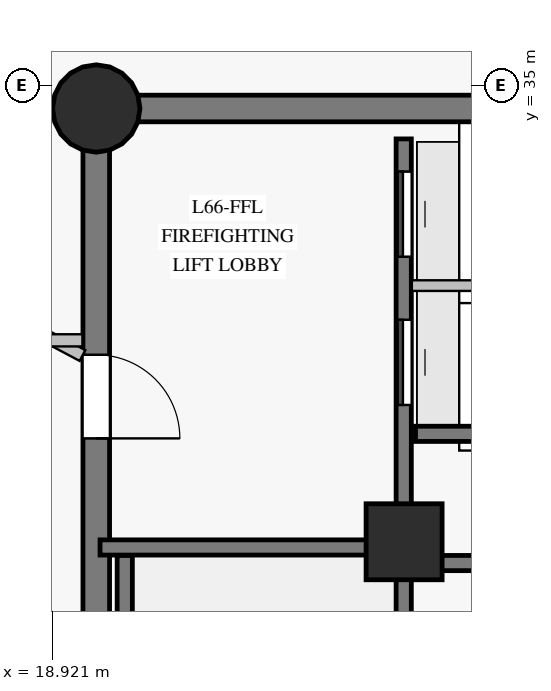
"""IFC4 building model, lengths in metres.
Left out: names, types, materials, properties, quantities, classifications, styles, units other than length and angle.
Written with IfcOpenShell. Run it as: python <this file> out.ifc"""

import sys

from ifc_helpers import new_model, si_unit, direction, frame, frame_2d, origin, origin_with_axes, origin_2d, place, context, subcontext, project, spatial, rectangle, circle, extrude, source, transform, mapped, element, fill, save


model = new_model("IFC4")
c1 = context("Model", 3, precision=1e-05, world=origin(), true_north=direction((0.0, 1.0)))
c2 = subcontext(c1, "Body", "Model", "MODEL_VIEW")
j1 = project(units=[si_unit("LENGTHUNIT", "METRE"), si_unit("PLANEANGLEUNIT", "RADIAN")], contexts=[c1])
p1 = place(None, origin())
s1 = spatial("IfcSite", under=j1, at=p1, CompositionType="ELEMENT")
p2 = place(p1, origin())
s2 = spatial("IfcBuilding", under=s1, at=p2, CompositionType="ELEMENT")
p3 = place(p2, frame((0.0, 0.0, 226.05)))
s3 = spatial("IfcBuildingStorey", under=s2, at=p3, CompositionType="ELEMENT", Elevation=226.05)
p4 = place(p3, frame((26.55, 34.7, 0.0), z_axis=(0.0, 0.0, 1.0), x_axis=(-1.0, 0.0, 0.0)))
e1 = element("IfcWall", 1, at=p4, inside=s3, PredefinedType="SHEAR", context=c2, shape_type="SweptSolid", body=[
    extrude(rectangle(XDim=7.05, YDim=0.35, at=frame_2d((3.525, 0.0))), origin(), (0.0, 0.0, 1.0), 2.85),
])
p5 = place(p3, frame((19.5, 34.7, 0.0), z_axis=(0.0, 0.0, 1.0), x_axis=(0.0, -1.0, 0.0)))
e2 = element("IfcWall", 2, at=p5, inside=s3, PredefinedType="SHEAR", context=c2, shape_type="SweptSolid", body=[
    extrude(rectangle(XDim=16.4, YDim=0.35, at=frame_2d((8.2, 0.0))), origin(), (0.0, 0.0, 1.0), 2.85),
])
p6 = place(p5, frame((3.24, 0.0, 0.0)))
e3 = element("IfcOpeningElement", 3, at=p6, cuts=e2, PredefinedType="OPENING", context=c2, shape_type="SweptSolid", body=[
    extrude(rectangle(XDim=1.1, YDim=2.15, at=frame_2d((0.55, 1.075))), frame((0.0, 0.185, 0.0), z_axis=(0.0, -1.0, 0.0), x_axis=(1.0, 0.0, 0.0)), (0.0, 0.0, 1.0), 0.37),
])
m1 = source(origin_with_axes(), c2, "Body", "SweptSolid", [
    extrude(circle(Radius=0.575, at=origin_2d()), origin(), (0.0, 0.0, 1.0), 3.05),
])
p7 = place(p3, frame((19.5, 34.7, 0.0), z_axis=(0.0, 0.0, 1.0), x_axis=(1.0, 0.0, 0.0)))
e4 = element("IfcColumn", 4, at=p7, inside=s3, PredefinedType="COLUMN", context=c2, shape_type="MappedRepresentation", body=[
    mapped(m1, transform((0.0, 0.0, 0.0), scale=1.0)),
])
m2 = source(origin_with_axes(), c2, "Body", "SweptSolid", [
    extrude(rectangle(XDim=1.0, YDim=1.0, at=origin_2d()), origin(), (0.0, 0.0, 1.0), 3.05),
])
p8 = place(p3, frame((23.55, 29.0, 0.0), z_axis=(0.0, 0.0, 1.0), x_axis=(1.0, 0.0, 0.0)))
e5 = element("IfcColumn", 5, at=p8, inside=s3, PredefinedType="COLUMN", context=c2, shape_type="MappedRepresentation", body=[
    mapped(m2, transform((0.0, 0.0, 0.0), scale=1.0)),
])
p9 = place(p3, frame((23.545, 18.7, 0.0), z_axis=(0.0, 0.0, 1.0), x_axis=(0.0, 1.0, 0.0)))
e6 = element("IfcWall", 6, at=p9, inside=s3, PredefinedType="SHEAR", context=c2, shape_type="SweptSolid", body=[
    extrude(rectangle(XDim=15.6, YDim=0.2, at=frame_2d((7.8, 0.0))), origin(), (0.0, 0.0, 1.0), 2.85),
])
p10 = place(p9, frame((2.75, 0.0, 0.0)))
e7 = element("IfcOpeningElement", 7, at=p10, cuts=e6, PredefinedType="OPENING", context=c2, shape_type="SweptSolid", body=[
    extrude(rectangle(XDim=1.15, YDim=2.15, at=frame_2d((0.575, 1.075))), frame((0.0, 0.11, 0.0), z_axis=(0.0, -1.0, 0.0), x_axis=(1.0, 0.0, 0.0)), (0.0, 0.0, 1.0), 0.22),
])
p11 = place(p9, frame((0.14, 0.0, 0.0)))
e8 = element("IfcOpeningElement", 8, at=p11, cuts=e6, PredefinedType="OPENING", context=c2, shape_type="SweptSolid", body=[
    extrude(rectangle(XDim=0.88, YDim=2.1, at=frame_2d((0.44, 1.05))), frame((0.0, 0.11, 0.0), z_axis=(0.0, -1.0, 0.0), x_axis=(1.0, 0.0, 0.0)), (0.0, 0.0, 1.0), 0.22),
])
p12 = place(p9, frame((1.36, 0.0, 0.0)))
e9 = element("IfcOpeningElement", 9, at=p12, cuts=e6, PredefinedType="OPENING", context=c2, shape_type="SweptSolid", body=[
    extrude(rectangle(XDim=0.88, YDim=2.1, at=frame_2d((0.44, 1.05))), frame((0.0, 0.11, 0.0), z_axis=(0.0, -1.0, 0.0), x_axis=(1.0, 0.0, 0.0)), (0.0, 0.0, 1.0), 0.22),
])
p13 = place(p9, frame((12.1, 0.0, 0.0)))
e10 = element("IfcOpeningElement", 10, at=p13, cuts=e6, PredefinedType="OPENING", context=c2, shape_type="SweptSolid", body=[
    extrude(rectangle(XDim=1.12, YDim=2.15, at=frame_2d((0.56, 1.075))), frame((0.0, 0.11, 0.0), z_axis=(0.0, -1.0, 0.0), x_axis=(1.0, 0.0, 0.0)), (0.0, 0.0, 1.0), 0.22),
])
p14 = place(p9, frame((14.05, 0.0, 0.0)))
e11 = element("IfcOpeningElement", 11, at=p14, cuts=e6, PredefinedType="OPENING", context=c2, shape_type="SweptSolid", body=[
    extrude(rectangle(XDim=1.12, YDim=2.15, at=frame_2d((0.56, 1.075))), frame((0.0, 0.11, 0.0), z_axis=(0.0, -1.0, 0.0), x_axis=(1.0, 0.0, 0.0)), (0.0, 0.0, 1.0), 0.22),
])
p15 = place(p3, frame((23.7, 28.72, 0.0), z_axis=(0.0, 0.0, 1.0), x_axis=(1.0, 0.0, 0.0)))
e12 = element("IfcWall", 12, at=p15, inside=s3, PredefinedType="SHEAR", context=c2, shape_type="SweptSolid", body=[
    extrude(rectangle(XDim=9.6, YDim=0.2, at=frame_2d((4.8, 0.0))), origin(), (0.0, 0.0, 1.0), 2.85),
])
p16 = place(p15, frame((1.1, 0.0, 0.0)))
e13 = element("IfcOpeningElement", 13, at=p16, cuts=e12, PredefinedType="OPENING", context=c2, shape_type="SweptSolid", body=[
    extrude(rectangle(XDim=0.92, YDim=2.1, at=frame_2d((0.46, 1.05))), frame((0.0, 0.11, 0.0), z_axis=(0.0, -1.0, 0.0), x_axis=(1.0, 0.0, 0.0)), (0.0, 0.0, 1.0), 0.22),
])
p17 = place(p15, frame((5.2, 0.0, 0.0)))
e14 = element("IfcOpeningElement", 14, at=p17, cuts=e12, PredefinedType="OPENING", context=c2, shape_type="SweptSolid", body=[
    extrude(rectangle(XDim=1.0, YDim=2.15, at=frame_2d((0.5, 1.075))), frame((0.0, 0.11, 0.0), z_axis=(0.0, -1.0, 0.0), x_axis=(1.0, 0.0, 0.0)), (0.0, 0.0, 1.0), 0.22),
])
p18 = place(p3, frame((19.875, 21.32, 0.0), z_axis=(0.0, 0.0, 1.0), x_axis=(0.0, 1.0, 0.0)))
e15 = element("IfcWall", 15, at=p18, inside=s3, PredefinedType="SHEAR", context=c2, shape_type="SweptSolid", body=[
    extrude(rectangle(XDim=7.5, YDim=0.2, at=frame_2d((3.75, 0.0))), origin(), (0.0, 0.0, 1.0), 2.85),
])
p19 = place(p3, frame((19.55, 28.925, 0.0), z_axis=(0.0, 0.0, 1.0), x_axis=(1.0, 0.0, 0.0)))
e16 = element("IfcWall", 16, at=p19, inside=s3, PredefinedType="SHEAR", context=c2, shape_type="SweptSolid", body=[
    extrude(rectangle(XDim=3.995, YDim=0.2, at=frame_2d((1.998, 0.0))), origin(), (0.0, 0.0, 1.0), 2.85),
])
p20 = place(p3, frame((23.7, 30.42, 0.0), z_axis=(0.0, 0.0, 1.0), x_axis=(1.0, 0.0, 0.0)))
e17 = element("IfcWall", 17, at=p20, inside=s3, PredefinedType="SHEAR", context=c2, shape_type="SweptSolid", body=[
    extrude(rectangle(XDim=2.78, YDim=0.2, at=frame_2d((1.39, 0.0))), origin(), (0.0, 0.0, 1.0), 2.85),
])
p21 = place(p3, frame((19.319, 31.45, 0.0), z_axis=(0.0, 0.0, 1.0), x_axis=(-0.882941204616, 0.469483577127, 0.0)))
e18 = element("IfcWall", 18, at=p21, inside=s3, PredefinedType="PARTITIONING", context=c2, shape_type="SweptSolid", body=[
    extrude(rectangle(XDim=10.201, YDim=0.16, at=frame_2d((5.101, 0.0))), origin(), (0.0, 0.0, 1.0), 2.85),
])
p22 = place(p3, frame((23.652, 32.37, 0.0), z_axis=(0.0, 0.0, 1.0), x_axis=(1.0, 0.0, 0.0)))
e19 = element("IfcWall", 19, at=p22, inside=s3, PredefinedType="PARTITIONING", context=c2, shape_type="SweptSolid", body=[
    extrude(rectangle(XDim=2.828, YDim=0.14, at=frame_2d((1.414, 0.0))), origin(), (0.0, 0.0, 1.0), 2.85),
])
p23 = place(p3, frame((16.75, 31.65, 0.0), z_axis=(0.0, 0.0, 1.0), x_axis=(1.0, 0.0, 0.0)))
e20 = element("IfcWall", 20, at=p23, inside=s3, PredefinedType="PARTITIONING", context=c2, shape_type="SweptSolid", body=[
    extrude(rectangle(XDim=2.568, YDim=0.16, at=frame_2d((1.284, 0.0))), origin(), (0.0, 0.0, 1.0), 2.85),
])
m3 = source(origin_with_axes(), c2, "Body", "SweptSolid", [
    extrude(rectangle(XDim=1.1, YDim=2.15, at=frame_2d((0.55, 1.075))), frame((0.0, 0.025, 0.0), z_axis=(0.0, -1.0, 0.0), x_axis=(1.0, 0.0, 0.0)), (0.0, 0.0, 1.0), 0.05),
])
p24 = place(p6, origin())
e21 = element("IfcDoor", 21, at=p24, inside=s3, OperationType="SINGLE_SWING_RIGHT", PredefinedType="DOOR", context=c2, shape_type="MappedRepresentation", body=[
    mapped(m3, transform((0.0, 0.0, 0.0), scale=1.0)),
])
fill(e3, e21)
m4 = source(origin_with_axes(), c2, "Body", "SweptSolid", [
    extrude(rectangle(XDim=1.12, YDim=2.15, at=frame_2d((0.56, 1.075))), frame((0.0, 0.025, 0.0), z_axis=(0.0, -1.0, 0.0), x_axis=(1.0, 0.0, 0.0)), (0.0, 0.0, 1.0), 0.05),
])
p25 = place(p13, origin())
e22 = element("IfcDoor", 22, at=p25, inside=s3, OperationType="SLIDING_TO_LEFT", PredefinedType="DOOR", context=c2, shape_type="MappedRepresentation", body=[
    mapped(m4, transform((0.0, 0.0, 0.0), scale=1.0)),
])
fill(e10, e22)
p26 = place(p14, origin())
e23 = element("IfcDoor", 23, at=p26, inside=s3, OperationType="SLIDING_TO_RIGHT", PredefinedType="DOOR", context=c2, shape_type="MappedRepresentation", body=[
    mapped(m4, transform((0.0, 0.0, 0.0), scale=1.0)),
])
fill(e11, e23)
save(model, sys.argv[1])
